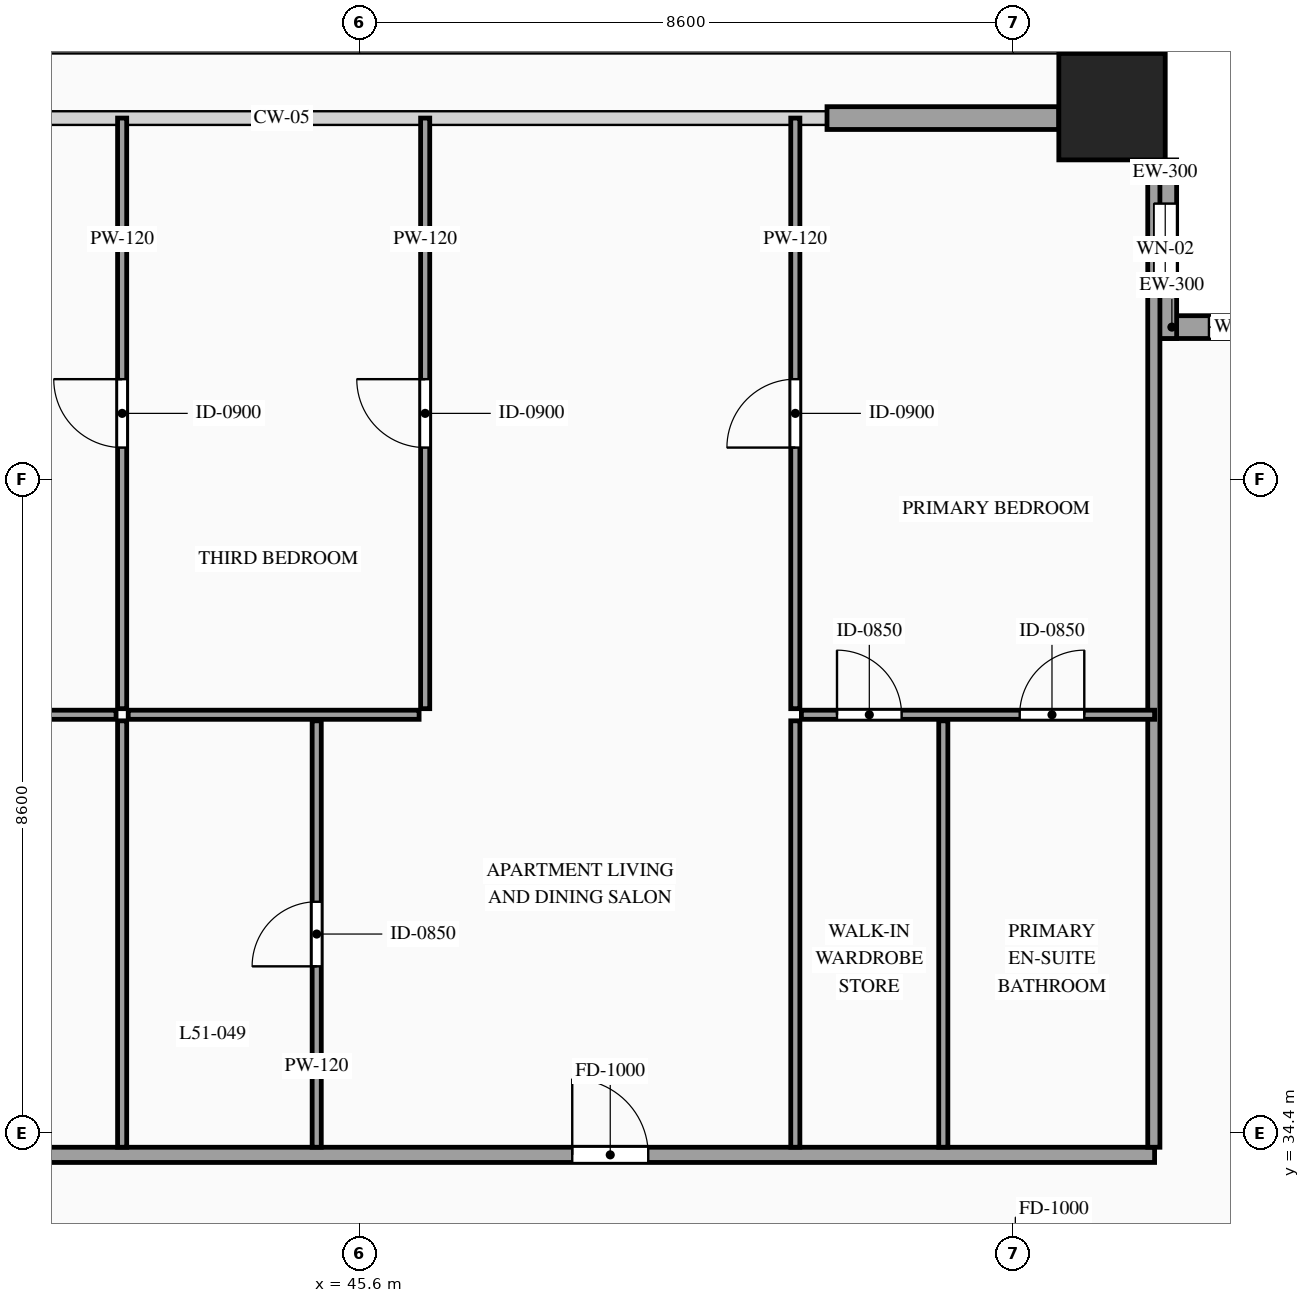
"""IFC4 building model, lengths in metres.
Left out: names, types, materials, properties, quantities, classifications, styles, units other than length and angle.
Written with IfcOpenShell. Run it as: python <this file> out.ifc"""

import sys

from ifc_helpers import new_model, si_unit, direction, frame, frame_2d, origin, origin_2d, place, context, subcontext, project, spatial, rectangle, hollow_rectangle, extrude, source, transform, mapped, element, fill, save


model = new_model("IFC4")
c1 = context("Model", 3, precision=1e-05, world=origin(), true_north=direction((0.0, 1.0)))
c2 = subcontext(c1, "Body", "Model", "MODEL_VIEW")
j1 = project(units=[si_unit("LENGTHUNIT", "METRE"), si_unit("PLANEANGLEUNIT", "RADIAN")], contexts=[c1])
p1 = place(None, origin())
s1 = spatial("IfcSite", under=j1, at=p1, CompositionType="ELEMENT")
p2 = place(p1, origin())
s2 = spatial("IfcBuilding", under=s1, at=p2, CompositionType="ELEMENT")
p3 = place(p2, frame((0.0, 0.0, 195.0)))
s3 = spatial("IfcBuildingStorey", under=s2, at=p3, CompositionType="ELEMENT", Elevation=195.0)
m1 = source(origin(), c2, "Body", "SweptSolid", [
    extrude(hollow_rectangle(XDim=1.4, YDim=1.4, WallThickness=0.06, at=origin_2d()), origin(), (0.0, 0.0, 1.0), 3.5),
])
p4 = place(p3, frame((55.5, 47.9, 0.0), z_axis=(0.0, 0.0, 1.0), x_axis=(1.0, 0.0, 0.0)))
e1 = element("IfcColumn", 1, at=p4, inside=s3, PredefinedType="COLUMN", context=c2, shape_type="MappedRepresentation", body=[
    mapped(m1, transform((0.0, 0.0, 0.0), scale=1.0)),
])
p5 = place(p3, frame((58.4, 45.0, 0.0), z_axis=(0.0, 0.0, 1.0), x_axis=(-1.0, 0.0, 0.0)))
e2 = element("IfcWall", 2, at=p5, inside=s3, PredefinedType="SOLIDWALL", context=c2, shape_type="SweptSolid", body=[
    extrude(rectangle(XDim=2.35, YDim=0.3, at=frame_2d((1.175, 0.0))), origin(), (0.0, 0.0, 1.0), 3.28),
])
p6 = place(p5, frame((0.725, 0.0, 0.85)))
e3 = element("IfcOpeningElement", 3, at=p6, cuts=e2, PredefinedType="OPENING", context=c2, shape_type="SweptSolid", body=[
    extrude(rectangle(XDim=0.9, YDim=1.5, at=frame_2d((0.45, 0.75))), frame((0.0, 0.165, 0.0), z_axis=(0.0, -1.0, 0.0), x_axis=(1.0, 0.0, 0.0)), (0.0, 0.0, 1.0), 0.33),
])
p7 = place(p3, frame((56.2, 44.85, 0.0), z_axis=(0.0, 0.0, 1.0), x_axis=(0.0, 1.0, 0.0)))
e4 = element("IfcWall", 4, at=p7, inside=s3, PredefinedType="SOLIDWALL", context=c2, shape_type="SweptSolid", body=[
    extrude(rectangle(XDim=2.35, YDim=0.3, at=frame_2d((1.175, 0.0))), origin(), (0.0, 0.0, 1.0), 3.28),
])
p8 = place(p7, frame((0.575, 0.0, 0.85)))
e5 = element("IfcOpeningElement", 5, at=p8, cuts=e4, PredefinedType="OPENING", context=c2, shape_type="SweptSolid", body=[
    extrude(rectangle(XDim=1.2, YDim=2.1, at=frame_2d((0.6, 1.05))), frame((0.0, 0.165, 0.0), z_axis=(0.0, -1.0, 0.0), x_axis=(1.0, 0.0, 0.0)), (0.0, 0.0, 1.0), 0.33),
])
m2 = source(origin(), c2, "Body", "SweptSolid", [
    extrude(rectangle(XDim=3.05, YDim=0.3, at=frame_2d((1.525, 0.0))), origin(), (0.0, 0.0, 1.0), 2.835),
])
p9 = place(p3, frame((51.75, 47.75, 0.0), z_axis=(0.0, 0.0, 1.0), x_axis=(1.0, 0.0, 0.0)))
e6 = element("IfcWall", 6, at=p9, inside=s3, PredefinedType="SOLIDWALL", context=c2, shape_type="MappedRepresentation", body=[
    mapped(m2, transform((0.0, 0.0, 0.0), scale=1.0)),
])
p10 = place(p3, frame((37.842, 34.11, 0.0), z_axis=(0.0, 0.0, 1.0), x_axis=(1.0, 0.0, 0.0)))
e7 = element("IfcWall", 7, at=p10, inside=s3, PredefinedType="PARTITIONING", context=c2, shape_type="SweptSolid", body=[
    extrude(rectangle(XDim=18.218, YDim=0.2, at=frame_2d((9.109, 0.0))), origin(), (0.0, 0.0, 1.0), 3.28),
])
p11 = place(p10, frame((10.556, 0.0, 0.0)))
e8 = element("IfcOpeningElement", 8, at=p11, cuts=e7, PredefinedType="OPENING", context=c2, shape_type="SweptSolid", body=[
    extrude(rectangle(XDim=1.0, YDim=2.2, at=frame_2d((0.5, 1.1))), frame((0.0, 0.115, 0.0), z_axis=(0.0, -1.0, 0.0), x_axis=(1.0, 0.0, 0.0)), (0.0, 0.0, 1.0), 0.23),
])
m3 = source(origin(), c2, "Body", "SweptSolid", [
    extrude(rectangle(XDim=13.39, YDim=0.16, at=frame_2d((6.695, 0.0))), origin(), (0.0, 0.0, 1.0), 3.28),
])
p12 = place(p3, frame((56.05, 34.21, 0.0), z_axis=(0.0, 0.0, 1.0), x_axis=(0.0, 1.0, 0.0)))
e9 = element("IfcWall", 9, at=p12, inside=s3, PredefinedType="PARTITIONING", context=c2, shape_type="MappedRepresentation", body=[
    mapped(m3, transform((0.0, 0.0, 0.0), scale=1.0)),
])
p13 = place(p3, frame((37.842, 39.9, 0.0), z_axis=(0.0, 0.0, 1.0), x_axis=(1.0, 0.0, 0.0)))
e10 = element("IfcWall", 10, at=p13, inside=s3, PredefinedType="PARTITIONING", context=c2, shape_type="SweptSolid", body=[
    extrude(rectangle(XDim=4.554, YDim=0.12, at=frame_2d((2.277, 0.0))), origin(), (0.0, 0.0, 1.0), 2.875),
])
p14 = place(p13, frame((1.852, 0.0, 0.0)))
e11 = element("IfcOpeningElement", 11, at=p14, cuts=e10, PredefinedType="OPENING", context=c2, shape_type="SweptSolid", body=[
    extrude(rectangle(XDim=0.85, YDim=2.1, at=frame_2d((0.425, 1.05))), frame((0.0, 0.075, 0.0), z_axis=(0.0, -1.0, 0.0), x_axis=(1.0, 0.0, 0.0)), (0.0, 0.0, 1.0), 0.15),
])
m4 = source(origin(), c2, "Body", "SweptSolid", [
    extrude(rectangle(XDim=5.61, YDim=0.12, at=frame_2d((2.805, 0.0))), origin(), (0.0, 0.0, 1.0), 3.28),
])
p15 = place(p3, frame((42.476, 34.21, 0.0), z_axis=(0.0, 0.0, 1.0), x_axis=(0.0, 1.0, 0.0)))
e12 = element("IfcWall", 12, at=p15, inside=s3, PredefinedType="PARTITIONING", context=c2, shape_type="MappedRepresentation", body=[
    mapped(m4, transform((0.0, 0.0, 0.0), scale=1.0)),
])
p16 = place(p3, frame((45.036, 34.21, 0.0), z_axis=(0.0, 0.0, 1.0), x_axis=(0.0, 1.0, 0.0)))
e13 = element("IfcWall", 13, at=p16, inside=s3, PredefinedType="PARTITIONING", context=c2, shape_type="SweptSolid", body=[
    extrude(rectangle(XDim=5.61, YDim=0.12, at=frame_2d((2.805, 0.0))), origin(), (0.0, 0.0, 1.0), 3.28),
])
p17 = place(p16, frame((2.38, 0.0, 0.0)))
e14 = element("IfcOpeningElement", 14, at=p17, cuts=e13, PredefinedType="OPENING", context=c2, shape_type="SweptSolid", body=[
    extrude(rectangle(XDim=0.85, YDim=2.1, at=frame_2d((0.425, 1.05))), frame((0.0, 0.075, 0.0), z_axis=(0.0, -1.0, 0.0), x_axis=(1.0, 0.0, 0.0)), (0.0, 0.0, 1.0), 0.15),
])
for number, where, z_axis, x_axis in (
    (15, (53.28, 34.21, 0.0), (0.0, 0.0, 1.0), (0.0, 1.0, 0.0)),
    (16, (51.333, 34.21, 0.0), (0.0, 0.0, 1.0), (0.0, 1.0, 0.0)),
):
    element("IfcWall", number, at=place(p3, frame(where, z_axis=z_axis, x_axis=x_axis)), inside=s3, PredefinedType="PARTITIONING", context=c2, shape_type="MappedRepresentation", body=[
        mapped(m4, transform((0.0, 0.0, 0.0), scale=1.0)),
    ])
p18 = place(p3, frame((42.476, 39.98, 0.0), z_axis=(0.0, 0.0, 1.0), x_axis=(0.0, 1.0, 0.0)))
e17 = element("IfcWall", 17, at=p18, inside=s3, PredefinedType="PARTITIONING", context=c2, shape_type="SweptSolid", body=[
    extrude(rectangle(XDim=7.77, YDim=0.12, at=frame_2d((3.885, 0.0))), origin(), (0.0, 0.0, 1.0), 3.28),
])
p19 = place(p18, frame((3.435, 0.0, 0.0)))
e18 = element("IfcOpeningElement", 18, at=p19, cuts=e17, PredefinedType="OPENING", context=c2, shape_type="SweptSolid", body=[
    extrude(rectangle(XDim=0.9, YDim=2.15, at=frame_2d((0.45, 1.075))), frame((0.0, 0.075, 0.0), z_axis=(0.0, -1.0, 0.0), x_axis=(1.0, 0.0, 0.0)), (0.0, 0.0, 1.0), 0.15),
])
p20 = place(p3, frame((51.413, 39.9, 0.0), z_axis=(0.0, 0.0, 1.0), x_axis=(1.0, 0.0, 0.0)))
e19 = element("IfcWall", 19, at=p20, inside=s3, PredefinedType="PARTITIONING", context=c2, shape_type="SweptSolid", body=[
    extrude(rectangle(XDim=4.647, YDim=0.12, at=frame_2d((2.323, 0.0))), origin(), (0.0, 0.0, 1.0), 3.28),
])
p21 = place(p20, frame((2.872, 0.0, 0.0)))
e20 = element("IfcOpeningElement", 20, at=p21, cuts=e19, PredefinedType="OPENING", context=c2, shape_type="SweptSolid", body=[
    extrude(rectangle(XDim=0.85, YDim=2.1, at=frame_2d((0.425, 1.05))), frame((0.0, 0.075, 0.0), z_axis=(0.0, -1.0, 0.0), x_axis=(1.0, 0.0, 0.0)), (0.0, 0.0, 1.0), 0.15),
])
p22 = place(p20, frame((0.469, 0.0, 0.0)))
e21 = element("IfcOpeningElement", 21, at=p22, cuts=e19, PredefinedType="OPENING", context=c2, shape_type="SweptSolid", body=[
    extrude(rectangle(XDim=0.85, YDim=2.1, at=frame_2d((0.425, 1.05))), frame((0.0, 0.075, 0.0), z_axis=(0.0, -1.0, 0.0), x_axis=(1.0, 0.0, 0.0)), (0.0, 0.0, 1.0), 0.15),
])
p23 = place(p3, frame((51.333, 39.98, 0.0), z_axis=(0.0, 0.0, 1.0), x_axis=(0.0, 1.0, 0.0)))
e22 = element("IfcWall", 22, at=p23, inside=s3, PredefinedType="PARTITIONING", context=c2, shape_type="SweptSolid", body=[
    extrude(rectangle(XDim=7.77, YDim=0.12, at=frame_2d((3.885, 0.0))), origin(), (0.0, 0.0, 1.0), 3.28),
])
p24 = place(p23, frame((3.435, 0.0, 0.0)))
e23 = element("IfcOpeningElement", 23, at=p24, cuts=e22, PredefinedType="OPENING", context=c2, shape_type="SweptSolid", body=[
    extrude(rectangle(XDim=0.9, YDim=2.15, at=frame_2d((0.45, 1.075))), frame((0.0, 0.075, 0.0), z_axis=(0.0, -1.0, 0.0), x_axis=(1.0, 0.0, 0.0)), (0.0, 0.0, 1.0), 0.15),
])
m5 = source(origin(), c2, "Body", "SweptSolid", [
    extrude(rectangle(XDim=3.827, YDim=0.12, at=frame_2d((1.914, 0.0))), origin(), (0.0, 0.0, 1.0), 2.875),
])
p25 = place(p3, frame((42.556, 39.9, 0.0), z_axis=(0.0, 0.0, 1.0), x_axis=(1.0, 0.0, 0.0)))
e24 = element("IfcWall", 24, at=p25, inside=s3, PredefinedType="PARTITIONING", context=c2, shape_type="MappedRepresentation", body=[
    mapped(m5, transform((0.0, 0.0, 0.0), scale=1.0)),
])
p26 = place(p3, frame((46.463, 39.98, 0.0), z_axis=(0.0, 0.0, 1.0), x_axis=(0.0, 1.0, 0.0)))
e25 = element("IfcWall", 25, at=p26, inside=s3, PredefinedType="PARTITIONING", context=c2, shape_type="SweptSolid", body=[
    extrude(rectangle(XDim=7.77, YDim=0.12, at=frame_2d((3.885, 0.0))), origin(), (0.0, 0.0, 1.0), 3.28),
])
p27 = place(p26, frame((3.435, 0.0, 0.0)))
e26 = element("IfcOpeningElement", 26, at=p27, cuts=e25, PredefinedType="OPENING", context=c2, shape_type="SweptSolid", body=[
    extrude(rectangle(XDim=0.9, YDim=2.15, at=frame_2d((0.45, 1.075))), frame((0.0, 0.075, 0.0), z_axis=(0.0, -1.0, 0.0), x_axis=(1.0, 0.0, 0.0)), (0.0, 0.0, 1.0), 0.15),
])
m6 = source(origin(), c2, "Body", "SweptSolid", [
    extrude(rectangle(XDim=0.9, YDim=1.5, at=frame_2d((0.45, 0.75))), frame((0.0, 0.03, 0.0), z_axis=(0.0, -1.0, 0.0), x_axis=(1.0, 0.0, 0.0)), (0.0, 0.0, 1.0), 0.06),
])
p28 = place(p6, origin())
e27 = element("IfcWindow", 27, at=p28, inside=s3, PartitioningType="SINGLE_PANEL", PredefinedType="WINDOW", context=c2, shape_type="MappedRepresentation", body=[
    mapped(m6, transform((0.0, 0.0, 0.0), scale=1.0)),
])
fill(e3, e27)
m7 = source(origin(), c2, "Body", "SweptSolid", [
    extrude(rectangle(XDim=1.2, YDim=2.1, at=frame_2d((0.6, 1.05))), frame((0.0, 0.03, 0.0), z_axis=(0.0, -1.0, 0.0), x_axis=(1.0, 0.0, 0.0)), (0.0, 0.0, 1.0), 0.06),
])
p29 = place(p8, origin())
e28 = element("IfcWindow", 28, at=p29, inside=s3, PartitioningType="SINGLE_PANEL", PredefinedType="WINDOW", context=c2, shape_type="MappedRepresentation", body=[
    mapped(m7, transform((0.0, 0.0, 0.0), scale=1.0)),
])
fill(e5, e28)
m8 = source(origin(), c2, "Body", "SweptSolid", [
    extrude(rectangle(XDim=1.0, YDim=2.2, at=frame_2d((0.5, 1.1))), frame((0.0, 0.025, 0.0), z_axis=(0.0, -1.0, 0.0), x_axis=(1.0, 0.0, 0.0)), (0.0, 0.0, 1.0), 0.05),
])
p30 = place(p11, origin())
e29 = element("IfcDoor", 29, at=p30, inside=s3, OperationType="SINGLE_SWING_LEFT", PredefinedType="DOOR", context=c2, shape_type="MappedRepresentation", body=[
    mapped(m8, transform((0.0, 0.0, 0.0), scale=1.0)),
])
fill(e8, e29)
m9 = source(origin(), c2, "Body", "SweptSolid", [
    extrude(rectangle(XDim=0.85, YDim=2.1, at=frame_2d((0.425, 1.05))), frame((0.0, 0.025, 0.0), z_axis=(0.0, -1.0, 0.0), x_axis=(1.0, 0.0, 0.0)), (0.0, 0.0, 1.0), 0.05),
])
p31 = place(p17, origin())
e30 = element("IfcDoor", 30, at=p31, inside=s3, OperationType="SINGLE_SWING_LEFT", PredefinedType="DOOR", context=c2, shape_type="MappedRepresentation", body=[
    mapped(m9, transform((0.0, 0.0, 0.0), scale=1.0)),
])
fill(e14, e30)
p32 = place(p21, origin())
e31 = element("IfcDoor", 31, at=p32, inside=s3, OperationType="SINGLE_SWING_RIGHT", PredefinedType="DOOR", context=c2, shape_type="MappedRepresentation", body=[
    mapped(m9, transform((0.0, 0.0, 0.0), scale=1.0)),
])
fill(e20, e31)
p33 = place(p22, origin())
e32 = element("IfcDoor", 32, at=p33, inside=s3, OperationType="SINGLE_SWING_LEFT", PredefinedType="DOOR", context=c2, shape_type="MappedRepresentation", body=[
    mapped(m9, transform((0.0, 0.0, 0.0), scale=1.0)),
])
fill(e21, e32)
m10 = source(origin(), c2, "Body", "SweptSolid", [
    extrude(rectangle(XDim=0.9, YDim=2.15, at=frame_2d((0.45, 1.075))), frame((0.0, 0.025, 0.0), z_axis=(0.0, -1.0, 0.0), x_axis=(1.0, 0.0, 0.0)), (0.0, 0.0, 1.0), 0.05),
])
p34 = place(p19, origin())
e33 = element("IfcDoor", 33, at=p34, inside=s3, OperationType="SINGLE_SWING_RIGHT", PredefinedType="DOOR", context=c2, shape_type="MappedRepresentation", body=[
    mapped(m10, transform((0.0, 0.0, 0.0), scale=1.0)),
])
fill(e18, e33)
p35 = place(p24, origin())
e34 = element("IfcDoor", 34, at=p35, inside=s3, OperationType="SINGLE_SWING_LEFT", PredefinedType="DOOR", context=c2, shape_type="MappedRepresentation", body=[
    mapped(m10, transform((0.0, 0.0, 0.0), scale=1.0)),
])
fill(e23, e34)
p36 = place(p27, origin())
e35 = element("IfcDoor", 35, at=p36, inside=s3, OperationType="SINGLE_SWING_RIGHT", PredefinedType="DOOR", context=c2, shape_type="MappedRepresentation", body=[
    mapped(m10, transform((0.0, 0.0, 0.0), scale=1.0)),
])
fill(e26, e35)
save(model, sys.argv[1])
